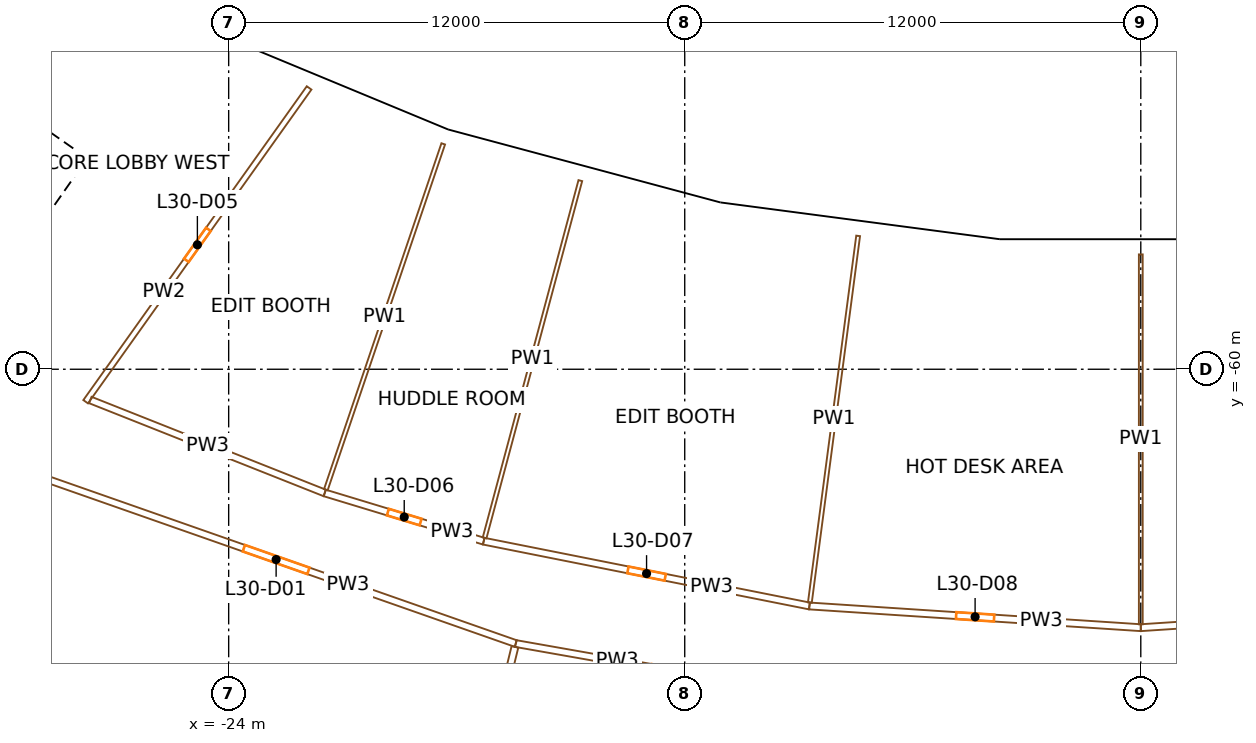
"""IFC4 building model, lengths in metres.
Left out: names, types, materials, properties, quantities, classifications, styles, units other than length and angle.
Written with IfcOpenShell. Run it as: python <this file> out.ifc"""

import sys

from ifc_helpers import new_model, si_unit, direction, frame, frame_2d, origin, origin_2d, place, context, subcontext, project, spatial, rectangle, extrude, element, fill, save


model = new_model("IFC4")
c1 = context("Model", 3, precision=1e-05, world=origin(), true_north=direction((0.0, 1.0)))
c2 = subcontext(c1, "Body", "Model", "MODEL_VIEW")
j1 = project(units=[si_unit("LENGTHUNIT", "METRE"), si_unit("PLANEANGLEUNIT", "RADIAN")], contexts=[c1])
p1 = place(None, origin())
s1 = spatial("IfcSite", under=j1, at=p1, CompositionType="ELEMENT")
p2 = place(p1, origin())
s2 = spatial("IfcBuilding", under=s1, at=p2, CompositionType="ELEMENT")
p3 = place(p2, frame((0.0, 0.0, 132.9)))
s3 = spatial("IfcBuildingStorey", under=s2, at=p3, CompositionType="ELEMENT", Elevation=132.9)
for number, where, z_axis, x_axis in (
    (1, (-25.763, -52.243, 0.0), (0.0, 0.0, 1.0), (0.897, -0.442, 0.0)),
    (2, (-18.724, -55.159, 0.0), (0.0, 0.0, 1.0), (0.947, -0.321, 0.0)),
    (3, (-11.364, -57.131, 0.0), (0.0, 0.0, 1.0), (0.981, -0.195, 0.0)),
    (4, (-3.81, -58.125, 0.0), (0.0, 0.0, 1.0), (0.998, -0.065, 0.0)),
):
    element("IfcColumn", number, at=place(p3, frame(where, z_axis=z_axis, x_axis=x_axis)), inside=s3, PredefinedType="COLUMN", context=c2, shape_type="SweptSolid", body=[
        extrude(rectangle(XDim=1.2, YDim=1.5, at=origin_2d()), origin(), (0.0, 0.0, 1.0), 3.8),
    ])
p4 = place(p3, frame((-36.717, -66.337, 0.0), z_axis=(0.0, 0.0, 1.0), x_axis=(0.573577477574, 0.819151315216, 0.0)))
e5 = element("IfcWall", 5, at=p4, inside=s3, PredefinedType="SHEAR", context=c2, shape_type="SweptSolid", body=[
    extrude(rectangle(XDim=14.8, YDim=0.9, at=frame_2d((7.4, 0.0))), origin(), (0.0, 0.0, 1.0), 3.5),
])
p5 = place(p4, frame((6.2, 0.0, 0.0)))
e6 = element("IfcOpeningElement", 6, at=p5, cuts=e5, PredefinedType="OPENING", context=c2, shape_type="SweptSolid", body=[
    extrude(rectangle(XDim=2.4, YDim=2.1, at=frame_2d((1.2, 1.05))), frame((0.0, 0.46, 0.0), z_axis=(0.0, -1.0, 0.0), x_axis=(1.0, 0.0, 0.0)), (0.0, 0.0, 1.0), 0.92),
])
p6 = place(p3, frame((-28.854, -54.324, 0.0), z_axis=(0.0, 0.0, 1.0), x_axis=(-0.819145767589, 0.573585400304, 0.0)))
e7 = element("IfcWall", 7, at=p6, inside=s3, PredefinedType="SHEAR", context=c2, shape_type="SweptSolid", body=[
    extrude(rectangle(XDim=15.045, YDim=0.9, at=frame_2d((7.523, 0.0))), origin(), (0.0, 0.0, 1.0), 3.5),
])
p7 = place(p6, frame((0.5, 0.0, 0.0)))
e8 = element("IfcOpeningElement", 8, at=p7, cuts=e7, PredefinedType="OPENING", context=c2, shape_type="SweptSolid", body=[
    extrude(rectangle(XDim=1.0, YDim=2.1, at=frame_2d((0.5, 1.05))), frame((0.0, 0.46, 0.0), z_axis=(0.0, -1.0, 0.0), x_axis=(1.0, 0.0, 0.0)), (0.0, 0.0, 1.0), 0.92),
])
p8 = place(p6, frame((2.625, 0.0, 0.0)))
e9 = element("IfcOpeningElement", 9, at=p8, cuts=e7, PredefinedType="OPENING", context=c2, shape_type="SweptSolid", body=[
    extrude(rectangle(XDim=1.0, YDim=2.1, at=frame_2d((0.5, 1.05))), frame((0.0, 0.46, 0.0), z_axis=(0.0, -1.0, 0.0), x_axis=(1.0, 0.0, 0.0)), (0.0, 0.0, 1.0), 0.92),
])
p9 = place(p6, frame((5.625, 0.0, 0.0)))
e10 = element("IfcOpeningElement", 10, at=p9, cuts=e7, PredefinedType="OPENING", context=c2, shape_type="SweptSolid", body=[
    extrude(rectangle(XDim=0.9, YDim=2.1, at=frame_2d((0.45, 1.05))), frame((0.0, 0.46, 0.0), z_axis=(0.0, -1.0, 0.0), x_axis=(1.0, 0.0, 0.0)), (0.0, 0.0, 1.0), 0.92),
])
p10 = place(p6, frame((13.495, 0.0, 0.0)))
e11 = element("IfcOpeningElement", 11, at=p10, cuts=e7, PredefinedType="OPENING", context=c2, shape_type="SweptSolid", body=[
    extrude(rectangle(XDim=1.1, YDim=2.1, at=frame_2d((0.55, 1.05))), frame((0.0, 0.46, 0.0), z_axis=(0.0, -1.0, 0.0), x_axis=(1.0, 0.0, 0.0)), (0.0, 0.0, 1.0), 0.92),
])
p11 = place(p3, frame((-18.267, -53.89, 0.0), z_axis=(0.0, 0.0, 1.0), x_axis=(-0.923879826967, 0.382682721486, 0.0)))
e12 = element("IfcWall", 12, at=p11, inside=s3, PredefinedType="SOLIDWALL", context=c2, shape_type="SweptSolid", body=[
    extrude(rectangle(XDim=7.493, YDim=0.4, at=frame_2d((3.747, 0.0))), origin(), (0.0, 0.0, 1.0), 2.7),
])
p12 = place(p11, frame((4.301, 0.0, 0.9)))
e13 = element("IfcOpeningElement", 13, at=p12, cuts=e12, PredefinedType="OPENING", context=c2, shape_type="SweptSolid", body=[
    extrude(rectangle(XDim=2.6, YDim=1.65, at=frame_2d((1.3, 0.825))), frame((0.0, 0.21, 0.0), z_axis=(0.0, -1.0, 0.0), x_axis=(1.0, 0.0, 0.0)), (0.0, 0.0, 1.0), 0.42),
])
p13 = place(p11, frame((0.592, 0.0, 0.9)))
e14 = element("IfcOpeningElement", 14, at=p13, cuts=e12, PredefinedType="OPENING", context=c2, shape_type="SweptSolid", body=[
    extrude(rectangle(XDim=2.6, YDim=1.65, at=frame_2d((1.3, 0.825))), frame((0.0, 0.21, 0.0), z_axis=(0.0, -1.0, 0.0), x_axis=(1.0, 0.0, 0.0)), (0.0, 0.0, 1.0), 0.42),
])
p14 = place(p3, frame((-11.15, -55.794, 0.0), z_axis=(0.0, 0.0, 1.0), x_axis=(-0.965924597867, 0.258823629594, 0.0)))
e15 = element("IfcWall", 15, at=p14, inside=s3, PredefinedType="SOLIDWALL", context=c2, shape_type="SweptSolid", body=[
    extrude(rectangle(XDim=7.342, YDim=0.4, at=frame_2d((3.671, 0.0))), origin(), (0.0, 0.0, 1.0), 2.7),
])
p15 = place(p14, frame((4.225, 0.0, 0.9)))
e16 = element("IfcOpeningElement", 16, at=p15, cuts=e15, PredefinedType="OPENING", context=c2, shape_type="SweptSolid", body=[
    extrude(rectangle(XDim=2.6, YDim=1.65, at=frame_2d((1.3, 0.825))), frame((0.0, 0.21, 0.0), z_axis=(0.0, -1.0, 0.0), x_axis=(1.0, 0.0, 0.0)), (0.0, 0.0, 1.0), 0.42),
])
p16 = place(p14, frame((0.517, 0.0, 0.9)))
e17 = element("IfcOpeningElement", 17, at=p16, cuts=e15, PredefinedType="OPENING", context=c2, shape_type="SweptSolid", body=[
    extrude(rectangle(XDim=2.6, YDim=1.65, at=frame_2d((1.3, 0.825))), frame((0.0, 0.21, 0.0), z_axis=(0.0, -1.0, 0.0), x_axis=(1.0, 0.0, 0.0)), (0.0, 0.0, 1.0), 0.42),
])
p17 = place(p3, frame((-3.697, -56.782, 0.0), z_axis=(0.0, 0.0, 1.0), x_axis=(-0.991444533306, 0.130528684121, 0.0)))
e18 = element("IfcWall", 18, at=p17, inside=s3, PredefinedType="SOLIDWALL", context=c2, shape_type="SweptSolid", body=[
    extrude(rectangle(XDim=7.493, YDim=0.4, at=frame_2d((3.747, 0.0))), origin(), (0.0, 0.0, 1.0), 2.7),
])
p18 = place(p17, frame((4.301, 0.0, 0.9)))
e19 = element("IfcOpeningElement", 19, at=p18, cuts=e18, PredefinedType="OPENING", context=c2, shape_type="SweptSolid", body=[
    extrude(rectangle(XDim=2.6, YDim=1.65, at=frame_2d((1.3, 0.825))), frame((0.0, 0.21, 0.0), z_axis=(0.0, -1.0, 0.0), x_axis=(1.0, 0.0, 0.0)), (0.0, 0.0, 1.0), 0.42),
])
p19 = place(p17, frame((0.592, 0.0, 0.9)))
e20 = element("IfcOpeningElement", 20, at=p19, cuts=e18, PredefinedType="OPENING", context=c2, shape_type="SweptSolid", body=[
    extrude(rectangle(XDim=2.6, YDim=1.65, at=frame_2d((1.3, 0.825))), frame((0.0, 0.21, 0.0), z_axis=(0.0, -1.0, 0.0), x_axis=(1.0, 0.0, 0.0)), (0.0, 0.0, 1.0), 0.42),
])
p20 = place(p3, frame((3.671, -56.779, 0.0), z_axis=(0.0, 0.0, 1.0), x_axis=(-1.0, 0.0, 0.0)))
e21 = element("IfcWall", 21, at=p20, inside=s3, PredefinedType="SOLIDWALL", context=c2, shape_type="SweptSolid", body=[
    extrude(rectangle(XDim=7.341, YDim=0.4, at=frame_2d((3.671, 0.0))), origin(), (0.0, 0.0, 1.0), 2.7),
])
p21 = place(p20, frame((4.225, 0.0, 0.9)))
e22 = element("IfcOpeningElement", 22, at=p21, cuts=e21, PredefinedType="OPENING", context=c2, shape_type="SweptSolid", body=[
    extrude(rectangle(XDim=2.6, YDim=1.65, at=frame_2d((1.3, 0.825))), frame((0.0, 0.21, 0.0), z_axis=(0.0, -1.0, 0.0), x_axis=(1.0, 0.0, 0.0)), (0.0, 0.0, 1.0), 0.42),
])
p22 = place(p20, frame((0.517, 0.0, 0.9)))
e23 = element("IfcOpeningElement", 23, at=p22, cuts=e21, PredefinedType="OPENING", context=c2, shape_type="SweptSolid", body=[
    extrude(rectangle(XDim=2.6, YDim=1.65, at=frame_2d((1.3, 0.825))), frame((0.0, 0.21, 0.0), z_axis=(0.0, -1.0, 0.0), x_axis=(1.0, 0.0, 0.0)), (0.0, 0.0, 1.0), 0.42),
])
p23 = place(p3, frame((-16.446, -67.217, 0.0), z_axis=(0.0, 0.0, 1.0), x_axis=(-0.943684765834, 0.330845980378, 0.0)))
e24 = element("IfcWall", 24, at=p23, inside=s3, PredefinedType="PARTITIONING", context=c2, shape_type="SweptSolid", body=[
    extrude(rectangle(XDim=13.363, YDim=0.18, at=frame_2d((6.682, 0.0))), origin(), (0.0, 0.0, 1.0), 2.4),
])
p24 = place(p23, frame((5.782, 0.0, 0.0)))
e25 = element("IfcOpeningElement", 25, at=p24, cuts=e24, PredefinedType="OPENING", context=c2, shape_type="SweptSolid", body=[
    extrude(rectangle(XDim=1.8, YDim=2.1, at=frame_2d((0.9, 1.05))), frame((0.0, 0.1, 0.0), z_axis=(0.0, -1.0, 0.0), x_axis=(1.0, 0.0, 0.0)), (0.0, 0.0, 1.0), 0.2),
])
p25 = place(p3, frame((-27.641, -60.809, 0.0), z_axis=(0.0, 0.0, 1.0), x_axis=(0.929586380114, -0.368604343308, 0.0)))
e26 = element("IfcWall", 26, at=p25, inside=s3, PredefinedType="PARTITIONING", context=c2, shape_type="SweptSolid", body=[
    extrude(rectangle(XDim=6.636, YDim=0.18, at=frame_2d((3.318, 0.0))), origin(), (0.0, 0.0, 1.0), 2.4),
])
p26 = place(p3, frame((-21.884, -52.598, 0.0), z_axis=(0.0, 0.0, 1.0), x_axis=(-0.580023139251, -0.814599998732, 0.0)))
e27 = element("IfcWall", 27, at=p26, inside=s3, PredefinedType="PARTITIONING", context=c2, shape_type="SweptSolid", body=[
    extrude(rectangle(XDim=10.136, YDim=0.15, at=frame_2d((5.068, 0.0))), origin(), (0.0, 0.0, 1.0), 2.4),
])
p27 = place(p26, frame((4.568, 0.0, 0.0)))
e28 = element("IfcOpeningElement", 28, at=p27, cuts=e27, PredefinedType="OPENING", context=c2, shape_type="SweptSolid", body=[
    extrude(rectangle(XDim=1.0, YDim=2.1, at=frame_2d((0.5, 1.05))), frame((0.0, 0.085, 0.0), z_axis=(0.0, -1.0, 0.0), x_axis=(1.0, 0.0, 0.0)), (0.0, 0.0, 1.0), 0.17),
])
p28 = place(p3, frame((-21.472, -63.255, 0.0), z_axis=(0.0, 0.0, 1.0), x_axis=(0.956933231095, -0.290308097072, 0.0)))
e29 = element("IfcWall", 29, at=p28, inside=s3, PredefinedType="PARTITIONING", context=c2, shape_type="SweptSolid", body=[
    extrude(rectangle(XDim=4.371, YDim=0.18, at=frame_2d((2.186, 0.0))), origin(), (0.0, 0.0, 1.0), 2.4),
])
p29 = place(p28, frame((1.736, 0.0, 0.0)))
e30 = element("IfcOpeningElement", 30, at=p29, cuts=e29, PredefinedType="OPENING", context=c2, shape_type="SweptSolid", body=[
    extrude(rectangle(XDim=0.9, YDim=2.1, at=frame_2d((0.45, 1.05))), frame((0.0, 0.1, 0.0), z_axis=(0.0, -1.0, 0.0), x_axis=(1.0, 0.0, 0.0)), (0.0, 0.0, 1.0), 0.2),
])
p30 = place(p3, frame((-18.763, -76.687, 0.0), z_axis=(0.0, 0.0, 1.0), x_axis=(0.237667739981, 0.971346511484, 0.0)))
e31 = element("IfcWall", 31, at=p30, inside=s3, PredefinedType="PARTITIONING", context=c2, shape_type="SweptSolid", body=[
    extrude(rectangle(XDim=9.659, YDim=0.18, at=frame_2d((4.83, 0.0))), origin(), (0.0, 0.0, 1.0), 2.4),
])
p31 = place(p3, frame((-18.354, -54.07, 0.0), z_axis=(0.0, 0.0, 1.0), x_axis=(-0.321428562801, -0.946933830326, 0.0)))
e32 = element("IfcWall", 32, at=p31, inside=s3, PredefinedType="PARTITIONING", context=c2, shape_type="SweptSolid", body=[
    extrude(rectangle(XDim=9.61, YDim=0.1, at=frame_2d((4.805, 0.0))), origin(), (0.0, 0.0, 1.0), 2.4),
])
p32 = place(p3, frame((-17.289, -64.524, 0.0), z_axis=(0.0, 0.0, 1.0), x_axis=(0.980786466832, -0.195084357342, 0.0)))
e33 = element("IfcWall", 33, at=p32, inside=s3, PredefinedType="PARTITIONING", context=c2, shape_type="SweptSolid", body=[
    extrude(rectangle(XDim=8.738, YDim=0.18, at=frame_2d((4.369, 0.0))), origin(), (0.0, 0.0, 1.0), 2.4),
])
p33 = place(p32, frame((3.869, 0.0, 0.0)))
e34 = element("IfcOpeningElement", 34, at=p33, cuts=e33, PredefinedType="OPENING", context=c2, shape_type="SweptSolid", body=[
    extrude(rectangle(XDim=1.0, YDim=2.1, at=frame_2d((0.5, 1.05))), frame((0.0, 0.1, 0.0), z_axis=(0.0, -1.0, 0.0), x_axis=(1.0, 0.0, 0.0)), (0.0, 0.0, 1.0), 0.2),
])
p34 = place(p3, frame((-7.541, -68.787, 0.0), z_axis=(0.0, 0.0, 1.0), x_axis=(-0.984811812319, 0.173625154619, 0.0)))
e35 = element("IfcWall", 35, at=p34, inside=s3, PredefinedType="PARTITIONING", context=c2, shape_type="SweptSolid", body=[
    extrude(rectangle(XDim=9.043, YDim=0.18, at=frame_2d((4.521, 0.0))), origin(), (0.0, 0.0, 1.0), 2.4),
])
p35 = place(p34, frame((3.621, 0.0, 0.0)))
e36 = element("IfcOpeningElement", 36, at=p35, cuts=e35, PredefinedType="OPENING", context=c2, shape_type="SweptSolid", body=[
    extrude(rectangle(XDim=1.8, YDim=2.1, at=frame_2d((0.9, 1.05))), frame((0.0, 0.1, 0.0), z_axis=(0.0, -1.0, 0.0), x_axis=(1.0, 0.0, 0.0)), (0.0, 0.0, 1.0), 0.2),
])
p36 = place(p3, frame((-14.747, -55.037, 0.0), z_axis=(0.0, 0.0, 1.0), x_axis=(-0.258828880572, -0.965923190829, 0.0)))
e37 = element("IfcWall", 37, at=p36, inside=s3, PredefinedType="PARTITIONING", context=c2, shape_type="SweptSolid", body=[
    extrude(rectangle(XDim=9.731, YDim=0.1, at=frame_2d((4.866, 0.0))), origin(), (0.0, 0.0, 1.0), 2.4),
])
p37 = place(p3, frame((-8.719, -66.229, 0.0), z_axis=(0.0, 0.0, 1.0), x_axis=(0.997858593599, -0.065408158359, 0.0)))
e38 = element("IfcWall", 38, at=p37, inside=s3, PredefinedType="PARTITIONING", context=c2, shape_type="SweptSolid", body=[
    extrude(rectangle(XDim=8.738, YDim=0.18, at=frame_2d((4.369, 0.0))), origin(), (0.0, 0.0, 1.0), 2.4),
])
p38 = place(p37, frame((3.869, 0.0, 0.0)))
e39 = element("IfcOpeningElement", 39, at=p38, cuts=e38, PredefinedType="OPENING", context=c2, shape_type="SweptSolid", body=[
    extrude(rectangle(XDim=1.0, YDim=2.1, at=frame_2d((0.5, 1.05))), frame((0.0, 0.1, 0.0), z_axis=(0.0, -1.0, 0.0), x_axis=(1.0, 0.0, 0.0)), (0.0, 0.0, 1.0), 0.2),
])
p39 = place(p3, frame((-7.437, -56.491, 0.0), z_axis=(0.0, 0.0, 1.0), x_axis=(-0.130531739513, -0.991444131043, 0.0)))
e40 = element("IfcWall", 40, at=p39, inside=s3, PredefinedType="PARTITIONING", context=c2, shape_type="SweptSolid", body=[
    extrude(rectangle(XDim=9.731, YDim=0.1, at=frame_2d((4.866, 0.0))), origin(), (0.0, 0.0, 1.0), 2.4),
])
p40 = place(p3, frame((0.0, -66.8, 0.0), z_axis=(0.0, 0.0, 1.0), x_axis=(0.997858593599, 0.065408158359, 0.0)))
e41 = element("IfcWall", 41, at=p40, inside=s3, PredefinedType="PARTITIONING", context=c2, shape_type="SweptSolid", body=[
    extrude(rectangle(XDim=8.738, YDim=0.18, at=frame_2d((4.369, 0.0))), origin(), (0.0, 0.0, 1.0), 2.4),
])
p41 = place(p40, frame((3.869, 0.0, 0.0)))
e42 = element("IfcOpeningElement", 42, at=p41, cuts=e41, PredefinedType="OPENING", context=c2, shape_type="SweptSolid", body=[
    extrude(rectangle(XDim=1.0, YDim=2.1, at=frame_2d((0.5, 1.05))), frame((0.0, 0.1, 0.0), z_axis=(0.0, -1.0, 0.0), x_axis=(1.0, 0.0, 0.0)), (0.0, 0.0, 1.0), 0.2),
])
p42 = place(p3, frame((0.0, -56.979, 0.0), z_axis=(0.0, 0.0, 1.0), x_axis=(0.0, -1.0, 0.0)))
e43 = element("IfcWall", 43, at=p42, inside=s3, PredefinedType="PARTITIONING", context=c2, shape_type="SweptSolid", body=[
    extrude(rectangle(XDim=9.731, YDim=0.1, at=frame_2d((4.866, 0.0))), origin(), (0.0, 0.0, 1.0), 2.4),
])
p43 = place(p12, origin())
e44 = element("IfcWindow", 44, at=p43, inside=s3, PartitioningType="SINGLE_PANEL", PredefinedType="WINDOW", context=c2, shape_type="SweptSolid", body=[
    extrude(rectangle(XDim=2.6, YDim=1.65, at=frame_2d((1.3, 0.825))), frame((0.0, 0.03, 0.0), z_axis=(0.0, -1.0, 0.0), x_axis=(1.0, 0.0, 0.0)), (0.0, 0.0, 1.0), 0.06),
])
fill(e13, e44)
p44 = place(p13, origin())
e45 = element("IfcWindow", 45, at=p44, inside=s3, PartitioningType="SINGLE_PANEL", PredefinedType="WINDOW", context=c2, shape_type="SweptSolid", body=[
    extrude(rectangle(XDim=2.6, YDim=1.65, at=frame_2d((1.3, 0.825))), frame((0.0, 0.03, 0.0), z_axis=(0.0, -1.0, 0.0), x_axis=(1.0, 0.0, 0.0)), (0.0, 0.0, 1.0), 0.06),
])
fill(e14, e45)
p45 = place(p15, origin())
e46 = element("IfcWindow", 46, at=p45, inside=s3, PartitioningType="SINGLE_PANEL", PredefinedType="WINDOW", context=c2, shape_type="SweptSolid", body=[
    extrude(rectangle(XDim=2.6, YDim=1.65, at=frame_2d((1.3, 0.825))), frame((0.0, 0.03, 0.0), z_axis=(0.0, -1.0, 0.0), x_axis=(1.0, 0.0, 0.0)), (0.0, 0.0, 1.0), 0.06),
])
fill(e16, e46)
p46 = place(p16, origin())
e47 = element("IfcWindow", 47, at=p46, inside=s3, PartitioningType="SINGLE_PANEL", PredefinedType="WINDOW", context=c2, shape_type="SweptSolid", body=[
    extrude(rectangle(XDim=2.6, YDim=1.65, at=frame_2d((1.3, 0.825))), frame((0.0, 0.03, 0.0), z_axis=(0.0, -1.0, 0.0), x_axis=(1.0, 0.0, 0.0)), (0.0, 0.0, 1.0), 0.06),
])
fill(e17, e47)
p47 = place(p18, origin())
e48 = element("IfcWindow", 48, at=p47, inside=s3, PartitioningType="SINGLE_PANEL", PredefinedType="WINDOW", context=c2, shape_type="SweptSolid", body=[
    extrude(rectangle(XDim=2.6, YDim=1.65, at=frame_2d((1.3, 0.825))), frame((0.0, 0.03, 0.0), z_axis=(0.0, -1.0, 0.0), x_axis=(1.0, 0.0, 0.0)), (0.0, 0.0, 1.0), 0.06),
])
fill(e19, e48)
p48 = place(p19, origin())
e49 = element("IfcWindow", 49, at=p48, inside=s3, PartitioningType="SINGLE_PANEL", PredefinedType="WINDOW", context=c2, shape_type="SweptSolid", body=[
    extrude(rectangle(XDim=2.6, YDim=1.65, at=frame_2d((1.3, 0.825))), frame((0.0, 0.03, 0.0), z_axis=(0.0, -1.0, 0.0), x_axis=(1.0, 0.0, 0.0)), (0.0, 0.0, 1.0), 0.06),
])
fill(e20, e49)
p49 = place(p21, origin())
e50 = element("IfcWindow", 50, at=p49, inside=s3, PartitioningType="SINGLE_PANEL", PredefinedType="WINDOW", context=c2, shape_type="SweptSolid", body=[
    extrude(rectangle(XDim=2.6, YDim=1.65, at=frame_2d((1.3, 0.825))), frame((0.0, 0.03, 0.0), z_axis=(0.0, -1.0, 0.0), x_axis=(1.0, 0.0, 0.0)), (0.0, 0.0, 1.0), 0.06),
])
fill(e22, e50)
p50 = place(p22, origin())
e51 = element("IfcWindow", 51, at=p50, inside=s3, PartitioningType="SINGLE_PANEL", PredefinedType="WINDOW", context=c2, shape_type="SweptSolid", body=[
    extrude(rectangle(XDim=2.6, YDim=1.65, at=frame_2d((1.3, 0.825))), frame((0.0, 0.03, 0.0), z_axis=(0.0, -1.0, 0.0), x_axis=(1.0, 0.0, 0.0)), (0.0, 0.0, 1.0), 0.06),
])
fill(e23, e51)
p51 = place(p24, origin())
e52 = element("IfcDoor", 52, at=p51, inside=s3, OperationType="DOUBLE_DOOR_SINGLE_SWING", PredefinedType="DOOR", context=c2, shape_type="SweptSolid", body=[
    extrude(rectangle(XDim=1.8, YDim=2.1, at=frame_2d((0.9, 1.05))), frame((0.0, 0.025, 0.0), z_axis=(0.0, -1.0, 0.0), x_axis=(1.0, 0.0, 0.0)), (0.0, 0.0, 1.0), 0.05),
])
fill(e25, e52)
p52 = place(p27, origin())
e53 = element("IfcDoor", 53, at=p52, inside=s3, OperationType="SINGLE_SWING_RIGHT", PredefinedType="DOOR", context=c2, shape_type="SweptSolid", body=[
    extrude(rectangle(XDim=1.0, YDim=2.1, at=frame_2d((0.5, 1.05))), frame((0.0, 0.025, 0.0), z_axis=(0.0, -1.0, 0.0), x_axis=(1.0, 0.0, 0.0)), (0.0, 0.0, 1.0), 0.05),
])
fill(e28, e53)
p53 = place(p29, origin())
e54 = element("IfcDoor", 54, at=p53, inside=s3, OperationType="SINGLE_SWING_RIGHT", PredefinedType="DOOR", context=c2, shape_type="SweptSolid", body=[
    extrude(rectangle(XDim=0.9, YDim=2.1, at=frame_2d((0.45, 1.05))), frame((0.0, 0.025, 0.0), z_axis=(0.0, -1.0, 0.0), x_axis=(1.0, 0.0, 0.0)), (0.0, 0.0, 1.0), 0.05),
])
fill(e30, e54)
p54 = place(p33, origin())
e55 = element("IfcDoor", 55, at=p54, inside=s3, OperationType="SINGLE_SWING_RIGHT", PredefinedType="DOOR", context=c2, shape_type="SweptSolid", body=[
    extrude(rectangle(XDim=1.0, YDim=2.1, at=frame_2d((0.5, 1.05))), frame((0.0, 0.025, 0.0), z_axis=(0.0, -1.0, 0.0), x_axis=(1.0, 0.0, 0.0)), (0.0, 0.0, 1.0), 0.05),
])
fill(e34, e55)
p55 = place(p38, origin())
e56 = element("IfcDoor", 56, at=p55, inside=s3, OperationType="SINGLE_SWING_RIGHT", PredefinedType="DOOR", context=c2, shape_type="SweptSolid", body=[
    extrude(rectangle(XDim=1.0, YDim=2.1, at=frame_2d((0.5, 1.05))), frame((0.0, 0.025, 0.0), z_axis=(0.0, -1.0, 0.0), x_axis=(1.0, 0.0, 0.0)), (0.0, 0.0, 1.0), 0.05),
])
fill(e39, e56)
save(model, sys.argv[1])
